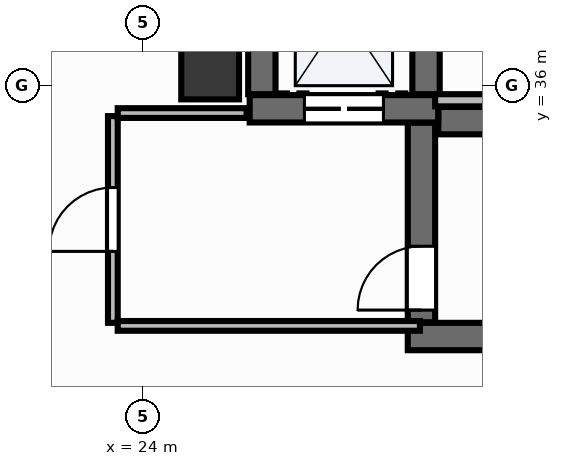
"""IFC4 building model, lengths in metres.
Left out: names, types, materials, properties, quantities, classifications, styles, units other than length and angle.
Written with IfcOpenShell. Run it as: python <this file> out.ifc"""

import sys

from ifc_helpers import new_model, si_unit, direction, frame, frame_2d, origin, origin_2d, place, context, subcontext, project, spatial, rectangle, extrude, element, fill, save


model = new_model("IFC4")
c1 = context("Model", 3, precision=1e-05, world=origin(), true_north=direction((0.0, 1.0)))
c2 = subcontext(c1, "Body", "Model", "MODEL_VIEW")
j1 = project(units=[si_unit("LENGTHUNIT", "METRE"), si_unit("PLANEANGLEUNIT", "RADIAN")], contexts=[c1])
p1 = place(None, origin())
s1 = spatial("IfcSite", under=j1, at=p1, CompositionType="ELEMENT")
p2 = place(p1, origin())
s2 = spatial("IfcBuilding", under=s1, at=p2, CompositionType="ELEMENT")
p3 = place(p2, frame((0.0, 0.0, -9.0)))
s3 = spatial("IfcBuildingStorey", under=s2, at=p3, CompositionType="ELEMENT", Elevation=-9.0)
p4 = place(p3, frame((28.852, 35.425, 0.0), z_axis=(0.0, 0.0, 1.0), x_axis=(1.0, 0.0, 0.0)))
e1 = element("IfcWall", 1, at=p4, inside=s3, PredefinedType="SHEAR", context=c2, shape_type="SweptSolid", body=[
    extrude(rectangle(XDim=8.248, YDim=0.45, at=frame_2d((4.124, 0.0))), origin(), (0.0, 0.0, 1.0), 4.18),
])
p5 = place(p3, frame((28.35, 31.875, 0.0), z_axis=(0.0, 0.0, 1.0), x_axis=(1.0, 0.0, 0.0)))
e2 = element("IfcWall", 2, at=p5, inside=s3, PredefinedType="SHEAR", context=c2, shape_type="SweptSolid", body=[
    extrude(rectangle(XDim=8.75, YDim=0.45, at=frame_2d((4.375, 0.0))), origin(), (0.0, 0.0, 1.0), 4.18),
])
p6 = place(p3, frame((28.575, 32.11, 0.0), z_axis=(0.0, 0.0, 1.0), x_axis=(0.0, 1.0, 0.0)))
e3 = element("IfcWall", 3, at=p6, inside=s3, PredefinedType="SHEAR", context=c2, shape_type="SweptSolid", body=[
    extrude(rectangle(XDim=3.283, YDim=0.45, at=frame_2d((1.642, 0.0))), origin(), (0.0, 0.0, 1.0), 4.18),
])
p7 = place(p6, frame((0.2, 0.0, 0.0)))
e4 = element("IfcOpeningElement", 4, at=p7, cuts=e3, PredefinedType="OPENING", context=c2, shape_type="SweptSolid", body=[
    extrude(rectangle(XDim=1.05, YDim=2.15, at=frame_2d((0.525, 1.075))), frame((0.0, 0.24, 0.0), z_axis=(0.0, -1.0, 0.0), x_axis=(1.0, 0.0, 0.0)), (0.0, 0.0, 1.0), 0.48),
])
p8 = place(p3, frame((25.75, 35.62, 0.0), z_axis=(0.0, 0.0, 1.0), x_axis=(1.0, 0.0, 0.0)))
e5 = element("IfcWall", 5, at=p8, inside=s3, PredefinedType="SHEAR", context=c2, shape_type="SweptSolid", body=[
    extrude(rectangle(XDim=3.1, YDim=0.45, at=frame_2d((1.55, 0.0))), origin(), (0.0, 0.0, 1.0), 4.18),
])
p9 = place(p8, frame((0.9, 0.0, 0.0)))
e6 = element("IfcOpeningElement", 6, at=p9, cuts=e5, PredefinedType="OPENING", context=c2, shape_type="SweptSolid", body=[
    extrude(rectangle(XDim=1.3, YDim=2.2, at=frame_2d((0.65, 1.1))), frame((0.0, 0.24, 0.0), z_axis=(0.0, -1.0, 0.0), x_axis=(1.0, 0.0, 0.0)), (0.0, 0.0, 1.0), 0.48),
])
for number, where, z_axis, x_axis in (
    (7, (25.95, 35.86, 0.0), (0.0, 0.0, 1.0), (0.0, 1.0, 0.0)),
    (8, (28.65, 35.86, 0.0), (0.0, 0.0, 1.0), (0.0, 1.0, 0.0)),
):
    element("IfcWall", number, at=place(p3, frame(where, z_axis=z_axis, x_axis=x_axis)), inside=s3, PredefinedType="SHEAR", context=c2, shape_type="SweptSolid", body=[
        extrude(rectangle(XDim=2.7, YDim=0.45, at=frame_2d((1.35, 0.0))), origin(), (0.0, 0.0, 1.0), 4.18),
    ])
p10 = place(p3, frame((25.1, 36.25, 0.0), z_axis=(0.0, 0.0, 1.0), x_axis=(1.0, 0.0, 0.0)))
e9 = element("IfcColumn", 9, at=p10, inside=s3, PredefinedType="PILASTER", context=c2, shape_type="SweptSolid", body=[
    extrude(rectangle(XDim=0.95, YDim=0.95, at=origin_2d()), origin(), (0.0, 0.0, 1.0), 4.18),
])
p11 = place(p3, frame((28.8, 35.76, 0.0), z_axis=(0.0, 0.0, 1.0), x_axis=(1.0, 0.0, 0.0)))
e10 = element("IfcWall", 10, at=p11, inside=s3, PredefinedType="PARTITIONING", context=c2, shape_type="SweptSolid", body=[
    extrude(rectangle(XDim=4.57, YDim=0.2, at=frame_2d((2.285, 0.0))), origin(), (0.0, 0.0, 1.0), 3.04),
])
p12 = place(p3, frame((23.5, 32.1, 0.0), z_axis=(0.0, 0.0, 1.0), x_axis=(0.0, 1.0, 0.0)))
e11 = element("IfcWall", 11, at=p12, inside=s3, PredefinedType="PARTITIONING", context=c2, shape_type="SweptSolid", body=[
    extrude(rectangle(XDim=3.4, YDim=0.16, at=frame_2d((1.7, 0.0))), origin(), (0.0, 0.0, 1.0), 3.04),
])
p13 = place(p12, frame((1.175, 0.0, 0.0)))
e12 = element("IfcOpeningElement", 12, at=p13, cuts=e11, PredefinedType="OPENING", context=c2, shape_type="SweptSolid", body=[
    extrude(rectangle(XDim=1.05, YDim=2.15, at=frame_2d((0.525, 1.075))), frame((0.0, 0.095, 0.0), z_axis=(0.0, -1.0, 0.0), x_axis=(1.0, 0.0, 0.0)), (0.0, 0.0, 1.0), 0.19),
])
p14 = place(p3, frame((23.58, 32.05, 0.0), z_axis=(0.0, 0.0, 1.0), x_axis=(1.0, 0.0, 0.0)))
e13 = element("IfcWall", 13, at=p14, inside=s3, PredefinedType="PARTITIONING", context=c2, shape_type="SweptSolid", body=[
    extrude(rectangle(XDim=4.97, YDim=0.16, at=frame_2d((2.485, 0.0))), origin(), (0.0, 0.0, 1.0), 3.04),
])
p15 = place(p3, frame((23.58, 35.55, 0.0), z_axis=(0.0, 0.0, 1.0), x_axis=(1.0, 0.0, 0.0)))
e14 = element("IfcWall", 14, at=p15, inside=s3, PredefinedType="PARTITIONING", context=c2, shape_type="SweptSolid", body=[
    extrude(rectangle(XDim=2.12, YDim=0.16, at=frame_2d((1.06, 0.0))), origin(), (0.0, 0.0, 1.0), 3.04),
])
p16 = place(p7, origin())
e15 = element("IfcDoor", 15, at=p16, inside=s3, OperationType="SINGLE_SWING_LEFT", PredefinedType="DOOR", context=c2, shape_type="SweptSolid", body=[
    extrude(rectangle(XDim=1.05, YDim=2.15, at=frame_2d((0.525, 1.075))), frame((0.0, 0.025, 0.0), z_axis=(0.0, -1.0, 0.0), x_axis=(1.0, 0.0, 0.0)), (0.0, 0.0, 1.0), 0.05),
])
fill(e4, e15)
p17 = place(p9, origin())
e16 = element("IfcDoor", 16, at=p17, inside=s3, OperationType="DOUBLE_DOOR_SLIDING", PredefinedType="DOOR", context=c2, shape_type="SweptSolid", body=[
    extrude(rectangle(XDim=1.3, YDim=2.2, at=frame_2d((0.65, 1.1))), frame((0.0, 0.025, 0.0), z_axis=(0.0, -1.0, 0.0), x_axis=(1.0, 0.0, 0.0)), (0.0, 0.0, 1.0), 0.05),
])
fill(e6, e16)
p18 = place(p13, origin())
e17 = element("IfcDoor", 17, at=p18, inside=s3, OperationType="SINGLE_SWING_LEFT", PredefinedType="DOOR", context=c2, shape_type="SweptSolid", body=[
    extrude(rectangle(XDim=1.05, YDim=2.15, at=frame_2d((0.525, 1.075))), frame((0.0, 0.025, 0.0), z_axis=(0.0, -1.0, 0.0), x_axis=(1.0, 0.0, 0.0)), (0.0, 0.0, 1.0), 0.05),
])
fill(e12, e17)
save(model, sys.argv[1])
